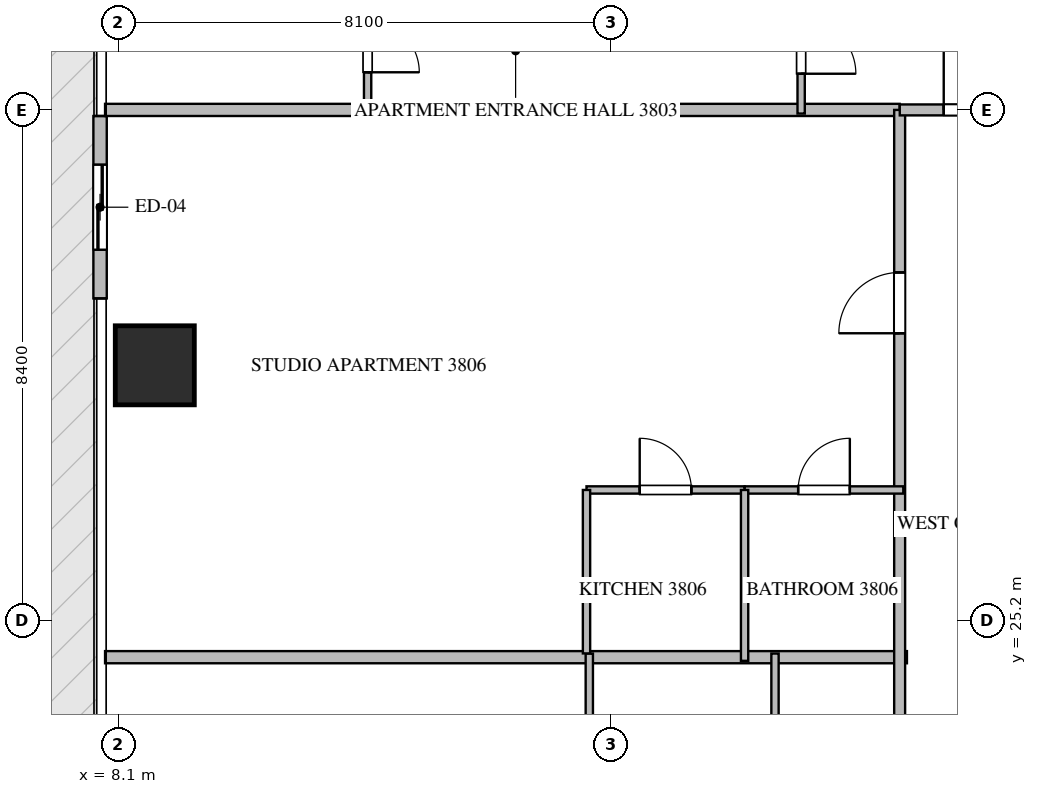
"""IFC4 building model, lengths in metres.
Left out: names, types, materials, properties, quantities, classifications, styles, units other than length and angle.
Written with IfcOpenShell. Run it as: python <this file> out.ifc"""

import sys

from ifc_helpers import new_model, si_unit, direction, frame, frame_2d, origin, origin_2d, place, context, subcontext, project, spatial, rectangle, extrude, source, transform, mapped, element, fill, save


model = new_model("IFC4")
c1 = context("Model", 3, precision=1e-05, world=origin(), true_north=direction((0.0, 1.0)))
c2 = subcontext(c1, "Body", "Model", "MODEL_VIEW")
j1 = project(units=[si_unit("LENGTHUNIT", "METRE"), si_unit("PLANEANGLEUNIT", "RADIAN")], contexts=[c1])
p1 = place(None, origin())
s1 = spatial("IfcSite", under=j1, at=p1, CompositionType="ELEMENT")
p2 = place(p1, origin())
s2 = spatial("IfcBuilding", under=s1, at=p2, CompositionType="ELEMENT")
p3 = place(p2, frame((0.0, 0.0, 153.9)))
s3 = spatial("IfcBuildingStorey", under=s2, at=p3, CompositionType="ELEMENT", Elevation=153.9)
m1 = source(origin(), c2, "Body", "SweptSolid", [
    extrude(rectangle(XDim=1.3, YDim=1.3, at=origin_2d()), origin(), (0.0, 0.0, 1.0), 3.75),
])
p4 = place(p3, frame((8.7, 29.4, -0.26), z_axis=(0.0, 0.0, 1.0), x_axis=(1.0, 0.0, 0.0)))
e1 = element("IfcColumn", 1, at=p4, inside=s3, PredefinedType="COLUMN", context=c2, shape_type="MappedRepresentation", body=[
    mapped(m1, transform((0.0, 0.0, 0.0), scale=1.0)),
])
p5 = place(p3, frame((7.8, 33.5, 0.0), z_axis=(0.0, 0.0, 1.0), x_axis=(0.0, -1.0, 0.0)))
e2 = element("IfcWall", 2, at=p5, inside=s3, PredefinedType="ELEMENTEDWALL", context=c2, shape_type="SweptSolid", body=[
    extrude(rectangle(XDim=3.0, YDim=0.22, at=frame_2d((1.5, 0.0))), origin(), (0.0, 0.0, 1.0), 3.475),
])
p6 = place(p5, frame((0.8, 0.0, 0.0)))
e3 = element("IfcOpeningElement", 3, at=p6, cuts=e2, PredefinedType="OPENING", context=c2, shape_type="SweptSolid", body=[
    extrude(rectangle(XDim=1.4, YDim=2.25, at=frame_2d((0.7, 1.125))), frame((0.0, 0.12, 0.0), z_axis=(0.0, -1.0, 0.0), x_axis=(1.0, 0.0, 0.0)), (0.0, 0.0, 1.0), 0.24),
])
p7 = place(p3, frame((7.882, 24.6, 0.0), z_axis=(0.0, 0.0, 1.0), x_axis=(1.0, 0.0, 0.0)))
e4 = element("IfcWall", 4, at=p7, inside=s3, PredefinedType="PARTITIONING", context=c2, shape_type="SweptSolid", body=[
    extrude(rectangle(XDim=13.188, YDim=0.2, at=frame_2d((6.594, 0.0))), origin(), (0.0, 0.0, 1.0), 3.49),
])
p8 = place(p3, frame((7.882, 33.6, 0.0), z_axis=(0.0, 0.0, 1.0), x_axis=(1.0, 0.0, 0.0)))
e5 = element("IfcWall", 5, at=p8, inside=s3, PredefinedType="PARTITIONING", context=c2, shape_type="SweptSolid", body=[
    extrude(rectangle(XDim=13.068, YDim=0.2, at=frame_2d((6.534, 0.0))), origin(), (0.0, 0.0, 1.0), 3.49),
])
p9 = place(p3, frame((20.95, 14.9, 0.0), z_axis=(0.0, 0.0, 1.0), x_axis=(0.0, 1.0, 0.0)))
e6 = element("IfcWall", 6, at=p9, inside=s3, PredefinedType="PARTITIONING", context=c2, shape_type="SweptSolid", body=[
    extrude(rectangle(XDim=18.7, YDim=0.18, at=frame_2d((9.35, 0.0))), origin(), (0.0, 0.0, 1.0), 3.49),
])
p10 = place(p9, frame((1.805, 0.0, 0.0)))
e7 = element("IfcOpeningElement", 7, at=p10, cuts=e6, PredefinedType="OPENING", context=c2, shape_type="SweptSolid", body=[
    extrude(rectangle(XDim=1.0, YDim=2.15, at=frame_2d((0.5, 1.075))), frame((0.0, 0.1, 0.0), z_axis=(0.0, -1.0, 0.0), x_axis=(1.0, 0.0, 0.0)), (0.0, 0.0, 1.0), 0.2),
])
p11 = place(p9, frame((15.027, 0.0, 0.0)))
e8 = element("IfcOpeningElement", 8, at=p11, cuts=e6, PredefinedType="OPENING", context=c2, shape_type="SweptSolid", body=[
    extrude(rectangle(XDim=1.0, YDim=2.15, at=frame_2d((0.5, 1.075))), frame((0.0, 0.1, 0.0), z_axis=(0.0, -1.0, 0.0), x_axis=(1.0, 0.0, 0.0)), (0.0, 0.0, 1.0), 0.2),
])
p12 = place(p3, frame((20.952, 33.6, 0.0), z_axis=(0.0, 0.0, 1.0), x_axis=(1.0, 0.0, 0.0)))
e9 = element("IfcWall", 9, at=p12, inside=s3, PredefinedType="PARTITIONING", context=c2, shape_type="SweptSolid", body=[
    extrude(rectangle(XDim=2.446, YDim=0.18, at=frame_2d((1.223, 0.0))), origin(), (0.0, 0.0, 1.0), 3.49),
])
p13 = place(p12, frame((0.723, 0.0, 0.0)))
e10 = element("IfcOpeningElement", 10, at=p13, cuts=e9, PredefinedType="OPENING", context=c2, shape_type="SweptSolid", body=[
    extrude(rectangle(XDim=1.0, YDim=2.15, at=frame_2d((0.5, 1.075))), frame((0.0, 0.1, 0.0), z_axis=(0.0, -1.0, 0.0), x_axis=(1.0, 0.0, 0.0)), (0.0, 0.0, 1.0), 0.2),
])
p14 = place(p3, frame((19.33, 35.75, 0.0), z_axis=(0.0, 0.0, 1.0), x_axis=(0.0, -1.0, 0.0)))
e11 = element("IfcWall", 11, at=p14, inside=s3, PredefinedType="PARTITIONING", context=c2, shape_type="SweptSolid", body=[
    extrude(rectangle(XDim=2.21, YDim=0.12, at=frame_2d((1.105, 0.0))), origin(), (0.0, 0.0, 1.0), 3.49),
])
p15 = place(p14, frame((0.655, 0.0, 0.0)))
e12 = element("IfcOpeningElement", 12, at=p15, cuts=e11, PredefinedType="OPENING", context=c2, shape_type="SweptSolid", body=[
    extrude(rectangle(XDim=0.9, YDim=2.1, at=frame_2d((0.45, 1.05))), frame((0.0, 0.07, 0.0), z_axis=(0.0, -1.0, 0.0), x_axis=(1.0, 0.0, 0.0)), (0.0, 0.0, 1.0), 0.14),
])
p16 = place(p3, frame((12.2, 35.748, 0.0), z_axis=(0.0, 0.0, 1.0), x_axis=(0.0, -1.0, 0.0)))
e13 = element("IfcWall", 13, at=p16, inside=s3, PredefinedType="PARTITIONING", context=c2, shape_type="SweptSolid", body=[
    extrude(rectangle(XDim=2.208, YDim=0.12, at=frame_2d((1.104, 0.0))), origin(), (0.0, 0.0, 1.0), 3.49),
])
p17 = place(p16, frame((0.679, 0.0, 0.0)))
e14 = element("IfcOpeningElement", 14, at=p17, cuts=e13, PredefinedType="OPENING", context=c2, shape_type="SweptSolid", body=[
    extrude(rectangle(XDim=0.85, YDim=2.1, at=frame_2d((0.425, 1.05))), frame((0.0, 0.07, 0.0), z_axis=(0.0, -1.0, 0.0), x_axis=(1.0, 0.0, 0.0)), (0.0, 0.0, 1.0), 0.14),
])
for number, where, z_axis, x_axis in (
    (15, (15.846, 19.4, 0.0), (0.0, 0.0, 1.0), (0.0, 1.0, 0.0)),
    (16, (18.9, 19.4, 0.0), (0.0, 0.0, 1.0), (0.0, 1.0, 0.0)),
):
    element("IfcWall", number, at=place(p3, frame(where, z_axis=z_axis, x_axis=x_axis)), inside=s3, PredefinedType="PARTITIONING", context=c2, shape_type="SweptSolid", body=[
        extrude(rectangle(XDim=5.26, YDim=0.12, at=frame_2d((2.63, 0.0))), origin(), (0.0, 0.0, 1.0), 3.49),
    ])
p18 = place(p3, frame((15.8, 27.35, 0.0), z_axis=(0.0, 0.0, 1.0), x_axis=(1.0, 0.0, 0.0)))
e17 = element("IfcWall", 17, at=p18, inside=s3, PredefinedType="PARTITIONING", context=c2, shape_type="SweptSolid", body=[
    extrude(rectangle(XDim=2.6, YDim=0.12, at=frame_2d((1.3, 0.0))), origin(), (0.0, 0.0, 1.0), 3.49),
])
p19 = place(p18, frame((0.875, 0.0, 0.0)))
e18 = element("IfcOpeningElement", 18, at=p19, cuts=e17, PredefinedType="OPENING", context=c2, shape_type="SweptSolid", body=[
    extrude(rectangle(XDim=0.85, YDim=2.1, at=frame_2d((0.425, 1.05))), frame((0.0, 0.07, 0.0), z_axis=(0.0, -1.0, 0.0), x_axis=(1.0, 0.0, 0.0)), (0.0, 0.0, 1.0), 0.14),
])
p20 = place(p3, frame((18.402, 27.35, 0.0), z_axis=(0.0, 0.0, 1.0), x_axis=(1.0, 0.0, 0.0)))
e19 = element("IfcWall", 19, at=p20, inside=s3, PredefinedType="PARTITIONING", context=c2, shape_type="SweptSolid", body=[
    extrude(rectangle(XDim=2.608, YDim=0.12, at=frame_2d((1.304, 0.0))), origin(), (0.0, 0.0, 1.0), 3.49),
])
p21 = place(p20, frame((0.879, 0.0, 0.0)))
e20 = element("IfcOpeningElement", 20, at=p21, cuts=e19, PredefinedType="OPENING", context=c2, shape_type="SweptSolid", body=[
    extrude(rectangle(XDim=0.85, YDim=2.1, at=frame_2d((0.425, 1.05))), frame((0.0, 0.07, 0.0), z_axis=(0.0, -1.0, 0.0), x_axis=(1.0, 0.0, 0.0)), (0.0, 0.0, 1.0), 0.14),
])
p22 = place(p3, frame((18.4, 24.54, 0.0), z_axis=(0.0, 0.0, 1.0), x_axis=(0.0, 1.0, 0.0)))
e21 = element("IfcWall", 21, at=p22, inside=s3, PredefinedType="PARTITIONING", context=c2, shape_type="SweptSolid", body=[
    extrude(rectangle(XDim=2.81, YDim=0.12, at=frame_2d((1.405, 0.0))), origin(), (0.0, 0.0, 1.0), 3.49),
])
p23 = place(p3, frame((15.8, 24.662, 0.0), z_axis=(0.0, 0.0, 1.0), x_axis=(0.0, 1.0, 0.0)))
e22 = element("IfcWall", 22, at=p23, inside=s3, PredefinedType="PARTITIONING", context=c2, shape_type="SweptSolid", body=[
    extrude(rectangle(XDim=2.688, YDim=0.12, at=frame_2d((1.344, 0.0))), origin(), (0.0, 0.0, 1.0), 3.49),
])
m2 = source(origin(), c2, "Body", "SweptSolid", [
    extrude(rectangle(XDim=1.4, YDim=2.25, at=frame_2d((0.7, 1.125))), frame((0.0, 0.025, 0.0), z_axis=(0.0, -1.0, 0.0), x_axis=(1.0, 0.0, 0.0)), (0.0, 0.0, 1.0), 0.05),
])
p24 = place(p6, origin())
e23 = element("IfcDoor", 23, at=p24, inside=s3, OperationType="SLIDING_TO_LEFT", PredefinedType="DOOR", context=c2, shape_type="MappedRepresentation", body=[
    mapped(m2, transform((0.0, 0.0, 0.0), scale=1.0)),
])
fill(e3, e23)
m3 = source(origin(), c2, "Body", "SweptSolid", [
    extrude(rectangle(XDim=1.0, YDim=2.15, at=frame_2d((0.5, 1.075))), frame((0.0, 0.025, 0.0), z_axis=(0.0, -1.0, 0.0), x_axis=(1.0, 0.0, 0.0)), (0.0, 0.0, 1.0), 0.05),
])
p25 = place(p11, origin())
e24 = element("IfcDoor", 24, at=p25, inside=s3, OperationType="SINGLE_SWING_LEFT", PredefinedType="DOOR", context=c2, shape_type="MappedRepresentation", body=[
    mapped(m3, transform((0.0, 0.0, 0.0), scale=1.0)),
])
fill(e8, e24)
p26 = place(p13, origin())
e25 = element("IfcDoor", 25, at=p26, inside=s3, OperationType="SINGLE_SWING_LEFT", PredefinedType="DOOR", context=c2, shape_type="MappedRepresentation", body=[
    mapped(m3, transform((0.0, 0.0, 0.0), scale=1.0)),
])
fill(e10, e25)
m4 = source(origin(), c2, "Body", "SweptSolid", [
    extrude(rectangle(XDim=0.9, YDim=2.1, at=frame_2d((0.45, 1.05))), frame((0.0, 0.025, 0.0), z_axis=(0.0, -1.0, 0.0), x_axis=(1.0, 0.0, 0.0)), (0.0, 0.0, 1.0), 0.05),
])
p27 = place(p15, origin())
e26 = element("IfcDoor", 26, at=p27, inside=s3, OperationType="SINGLE_SWING_RIGHT", PredefinedType="DOOR", context=c2, shape_type="MappedRepresentation", body=[
    mapped(m4, transform((0.0, 0.0, 0.0), scale=1.0)),
])
fill(e12, e26)
m5 = source(origin(), c2, "Body", "SweptSolid", [
    extrude(rectangle(XDim=0.85, YDim=2.1, at=frame_2d((0.425, 1.05))), frame((0.0, 0.025, 0.0), z_axis=(0.0, -1.0, 0.0), x_axis=(1.0, 0.0, 0.0)), (0.0, 0.0, 1.0), 0.05),
])
p28 = place(p17, origin())
e27 = element("IfcDoor", 27, at=p28, inside=s3, OperationType="SINGLE_SWING_RIGHT", PredefinedType="DOOR", context=c2, shape_type="MappedRepresentation", body=[
    mapped(m5, transform((0.0, 0.0, 0.0), scale=1.0)),
])
fill(e14, e27)
p29 = place(p19, origin())
e28 = element("IfcDoor", 28, at=p29, inside=s3, OperationType="SINGLE_SWING_LEFT", PredefinedType="DOOR", context=c2, shape_type="MappedRepresentation", body=[
    mapped(m5, transform((0.0, 0.0, 0.0), scale=1.0)),
])
fill(e18, e28)
p30 = place(p21, origin())
e29 = element("IfcDoor", 29, at=p30, inside=s3, OperationType="SINGLE_SWING_RIGHT", PredefinedType="DOOR", context=c2, shape_type="MappedRepresentation", body=[
    mapped(m5, transform((0.0, 0.0, 0.0), scale=1.0)),
])
fill(e20, e29)
save(model, sys.argv[1])
